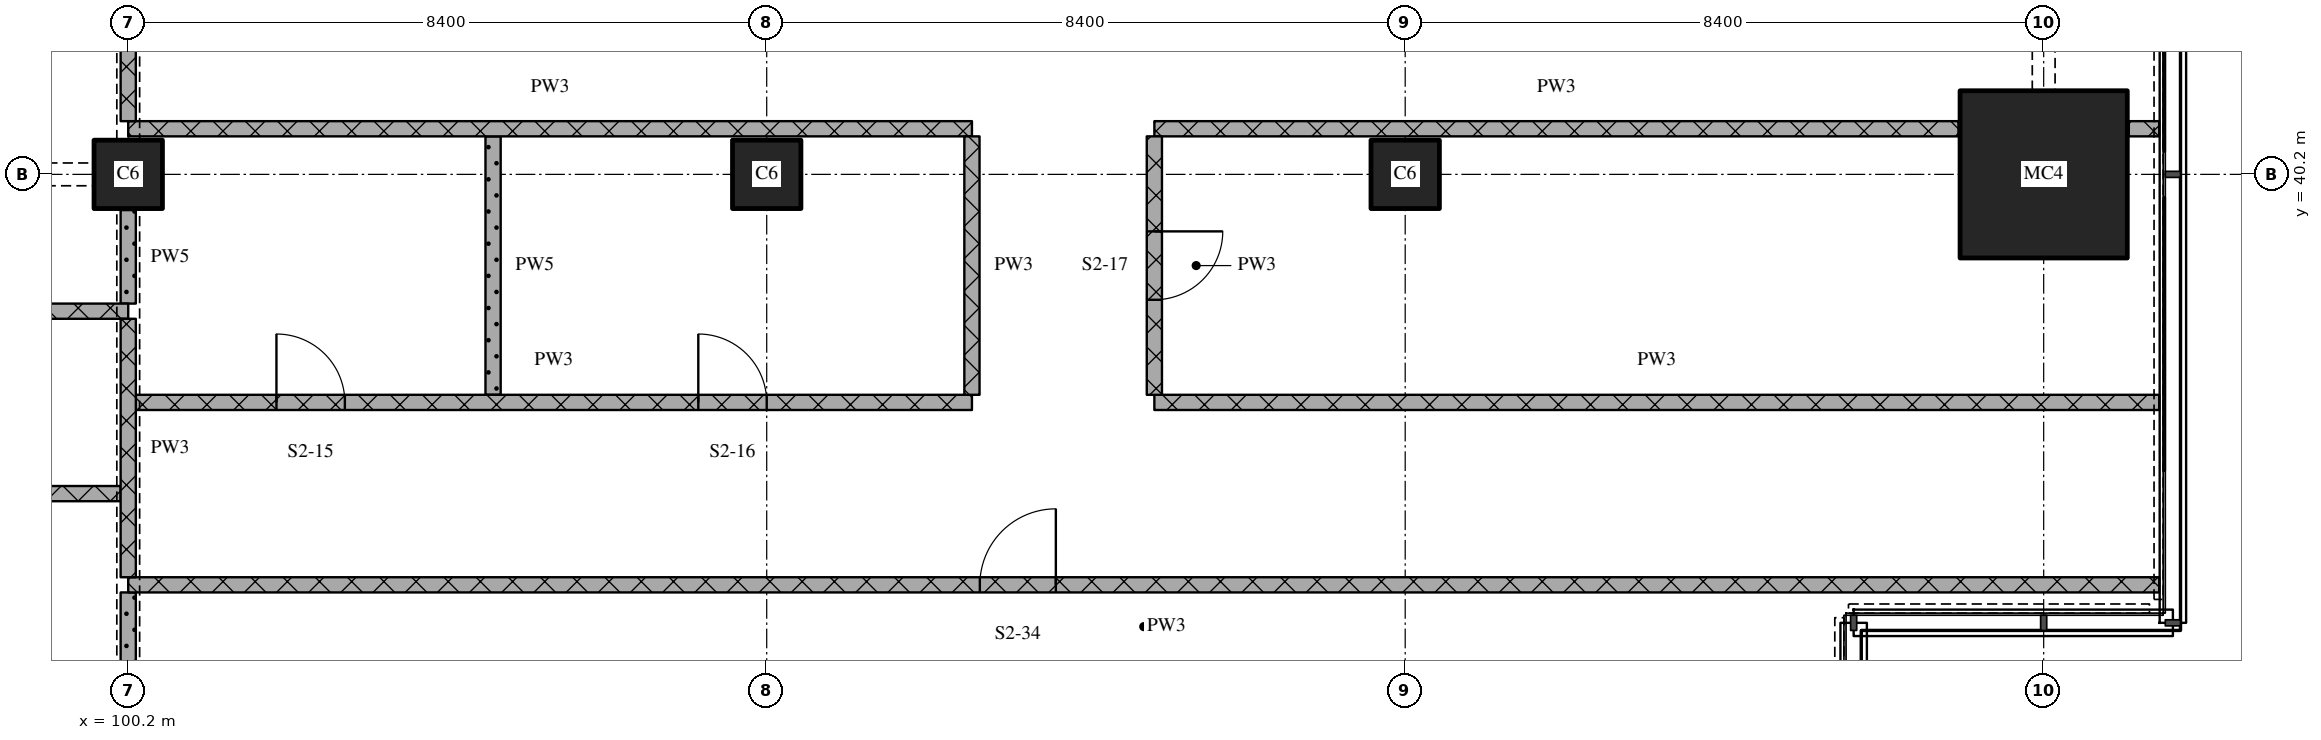
"""IFC4 building model, lengths in metres.
Left out: names, types, materials, properties, quantities, classifications, styles, units other than length and angle.
Written with IfcOpenShell. Run it as: python <this file> out.ifc"""

import sys

from ifc_helpers import new_model, si_unit, direction, frame, frame_2d, origin, origin_2d, place, context, subcontext, project, spatial, rectangle, extrude, element, fill, save


model = new_model("IFC4")
c1 = context("Model", 3, precision=1e-05, world=origin(), true_north=direction((0.0, 1.0)))
c2 = subcontext(c1, "Body", "Model", "MODEL_VIEW")
j1 = project(units=[si_unit("LENGTHUNIT", "METRE"), si_unit("PLANEANGLEUNIT", "RADIAN")], contexts=[c1])
p1 = place(None, origin())
s1 = spatial("IfcSite", under=j1, at=p1, CompositionType="ELEMENT")
p2 = place(p1, origin())
s2 = spatial("IfcBuilding", under=s1, at=p2, CompositionType="ELEMENT")
p3 = place(p2, frame((0.0, 0.0, 32.7)))
s3 = spatial("IfcBuildingStorey", under=s2, at=p3, CompositionType="ELEMENT", Elevation=32.7)
for number, where, z_axis, x_axis in (
    (1, (100.2, 40.2, 0.0), (0.0, 0.0, 1.0), (1.0, 0.0, 0.0)),
    (2, (108.6, 40.2, 0.0), (0.0, 0.0, 1.0), (1.0, 0.0, 0.0)),
    (3, (117.0, 40.2, 0.0), (0.0, 0.0, 1.0), (1.0, 0.0, 0.0)),
):
    element("IfcColumn", number, at=place(p3, frame(where, z_axis=z_axis, x_axis=x_axis)), inside=s3, PredefinedType="COLUMN", context=c2, shape_type="SweptSolid", body=[
        extrude(rectangle(XDim=0.9, YDim=0.9, at=origin_2d()), origin(), (0.0, 0.0, 1.0), 4.5),
    ])
p4 = place(p3, frame((125.4, 40.2, 0.0), z_axis=(0.0, 0.0, 1.0), x_axis=(1.0, 0.0, 0.0)))
e4 = element("IfcColumn", 4, at=p4, inside=s3, PredefinedType="COLUMN", context=c2, shape_type="SweptSolid", body=[
    extrude(rectangle(XDim=2.2, YDim=2.2, at=origin_2d()), origin(), (0.0, 0.0, 1.0), 4.5),
])
p5 = place(p3, frame((126.92, 34.8, 0.0), z_axis=(0.0, 0.0, 1.0), x_axis=(-1.0, 0.0, 0.0)))
e5 = element("IfcWall", 5, at=p5, inside=s3, PredefinedType="PARTITIONING", context=c2, shape_type="SweptSolid", body=[
    extrude(rectangle(XDim=26.72, YDim=0.2, at=frame_2d((13.36, 0.0))), origin(), (0.0, 0.0, 1.0), 4.22),
])
p6 = place(p5, frame((14.516, 0.0, 0.0)))
e6 = element("IfcOpeningElement", 6, at=p6, cuts=e5, PredefinedType="OPENING", context=c2, shape_type="SweptSolid", body=[
    extrude(rectangle(XDim=1.0, YDim=2.1, at=frame_2d((0.5, 1.05))), frame((0.0, 0.11, 0.0), z_axis=(0.0, -1.0, 0.0), x_axis=(1.0, 0.0, 0.0)), (0.0, 0.0, 1.0), 0.22),
])
p7 = place(p3, frame((100.1, 36.0, 0.0), z_axis=(0.0, 0.0, 1.0), x_axis=(-1.0, 0.0, 0.0)))
e7 = element("IfcWall", 7, at=p7, inside=s3, PredefinedType="PARTITIONING", context=c2, shape_type="SweptSolid", body=[
    extrude(rectangle(XDim=25.0, YDim=0.2, at=frame_2d((12.5, 0.0))), origin(), (0.0, 0.0, 1.0), 4.22),
])
p8 = place(p7, frame((12.0, 0.0, 0.0)))
e8 = element("IfcOpeningElement", 8, at=p8, cuts=e7, PredefinedType="OPENING", context=c2, shape_type="SweptSolid", body=[
    extrude(rectangle(XDim=1.0, YDim=2.1, at=frame_2d((0.5, 1.05))), frame((0.0, 0.11, 0.0), z_axis=(0.0, -1.0, 0.0), x_axis=(1.0, 0.0, 0.0)), (0.0, 0.0, 1.0), 0.22),
])
p9 = place(p3, frame((100.3, 37.2, 0.0), z_axis=(0.0, 0.0, 1.0), x_axis=(1.0, 0.0, 0.0)))
e9 = element("IfcWall", 9, at=p9, inside=s3, PredefinedType="PARTITIONING", context=c2, shape_type="SweptSolid", body=[
    extrude(rectangle(XDim=11.0, YDim=0.2, at=frame_2d((5.5, 0.0))), origin(), (0.0, 0.0, 1.0), 4.22),
])
p10 = place(p9, frame((1.85, 0.0, 0.0)))
e10 = element("IfcOpeningElement", 10, at=p10, cuts=e9, PredefinedType="OPENING", context=c2, shape_type="SweptSolid", body=[
    extrude(rectangle(XDim=0.9, YDim=2.1, at=frame_2d((0.45, 1.05))), frame((0.0, 0.11, 0.0), z_axis=(0.0, -1.0, 0.0), x_axis=(1.0, 0.0, 0.0)), (0.0, 0.0, 1.0), 0.22),
])
p11 = place(p9, frame((7.4, 0.0, 0.0)))
e11 = element("IfcOpeningElement", 11, at=p11, cuts=e9, PredefinedType="OPENING", context=c2, shape_type="SweptSolid", body=[
    extrude(rectangle(XDim=0.9, YDim=2.1, at=frame_2d((0.45, 1.05))), frame((0.0, 0.11, 0.0), z_axis=(0.0, -1.0, 0.0), x_axis=(1.0, 0.0, 0.0)), (0.0, 0.0, 1.0), 0.22),
])
p12 = place(p3, frame((113.7, 37.2, 0.0), z_axis=(0.0, 0.0, 1.0), x_axis=(1.0, 0.0, 0.0)))
e12 = element("IfcWall", 12, at=p12, inside=s3, PredefinedType="PARTITIONING", context=c2, shape_type="SweptSolid", body=[
    extrude(rectangle(XDim=13.22, YDim=0.2, at=frame_2d((6.61, 0.0))), origin(), (0.0, 0.0, 1.0), 4.22),
])
p13 = place(p3, frame((88.8, 38.4, 0.0), z_axis=(0.0, 0.0, 1.0), x_axis=(1.0, 0.0, 0.0)))
e13 = element("IfcWall", 13, at=p13, inside=s3, PredefinedType="PARTITIONING", context=c2, shape_type="SweptSolid", body=[
    extrude(rectangle(XDim=11.4, YDim=0.2, at=frame_2d((5.7, 0.0))), origin(), (0.0, 0.0, 1.0), 4.22),
])
p14 = place(p13, frame((4.95, 0.0, 0.0)))
e14 = element("IfcOpeningElement", 14, at=p14, cuts=e13, PredefinedType="OPENING", context=c2, shape_type="SweptSolid", body=[
    extrude(rectangle(XDim=0.9, YDim=2.1, at=frame_2d((0.45, 1.05))), frame((0.0, 0.11, 0.0), z_axis=(0.0, -1.0, 0.0), x_axis=(1.0, 0.0, 0.0)), (0.0, 0.0, 1.0), 0.22),
])
p15 = place(p13, frame((9.15, 0.0, 0.0)))
e15 = element("IfcOpeningElement", 15, at=p15, cuts=e13, PredefinedType="OPENING", context=c2, shape_type="SweptSolid", body=[
    extrude(rectangle(XDim=0.9, YDim=2.1, at=frame_2d((0.45, 1.05))), frame((0.0, 0.11, 0.0), z_axis=(0.0, -1.0, 0.0), x_axis=(1.0, 0.0, 0.0)), (0.0, 0.0, 1.0), 0.22),
])
p16 = place(p3, frame((100.2, 40.8, 0.0), z_axis=(0.0, 0.0, 1.0), x_axis=(1.0, 0.0, 0.0)))
e16 = element("IfcWall", 16, at=p16, inside=s3, PredefinedType="PARTITIONING", context=c2, shape_type="SweptSolid", body=[
    extrude(rectangle(XDim=11.1, YDim=0.2, at=frame_2d((5.55, 0.0))), origin(), (0.0, 0.0, 1.0), 4.22),
])
p17 = place(p3, frame((113.7, 40.8, 0.0), z_axis=(0.0, 0.0, 1.0), x_axis=(1.0, 0.0, 0.0)))
e17 = element("IfcWall", 17, at=p17, inside=s3, PredefinedType="PARTITIONING", context=c2, shape_type="SweptSolid", body=[
    extrude(rectangle(XDim=10.58, YDim=0.2, at=frame_2d((5.29, 0.0))), origin(), (0.0, 0.0, 1.0), 4.22),
])
p18 = place(p3, frame((126.52, 40.8, 0.0), z_axis=(0.0, 0.0, 1.0), x_axis=(1.0, 0.0, 0.0)))
e18 = element("IfcWall", 18, at=p18, inside=s3, PredefinedType="PARTITIONING", context=c2, shape_type="SweptSolid", body=[
    extrude(rectangle(XDim=0.4, YDim=0.2, at=frame_2d((0.2, 0.0))), origin(), (0.0, 0.0, 1.0), 4.22),
])
p19 = place(p3, frame((100.2, 38.3, 0.0), z_axis=(0.0, 0.0, 1.0), x_axis=(0.0, -1.0, 0.0)))
e19 = element("IfcWall", 19, at=p19, inside=s3, PredefinedType="PARTITIONING", context=c2, shape_type="SweptSolid", body=[
    extrude(rectangle(XDim=3.4, YDim=0.2, at=frame_2d((1.7, 0.0))), origin(), (0.0, 0.0, 1.0), 3.73),
])
p20 = place(p3, frame((100.2, 43.1, 0.0), z_axis=(0.0, 0.0, 1.0), x_axis=(0.0, -1.0, 0.0)))
e20 = element("IfcWall", 20, at=p20, inside=s3, PredefinedType="PARTITIONING", context=c2, shape_type="SweptSolid", body=[
    extrude(rectangle(XDim=2.2, YDim=0.2, at=frame_2d((1.1, 0.0))), origin(), (0.0, 0.0, 1.0), 3.33),
])
p21 = place(p3, frame((100.2, 34.7, 0.0), z_axis=(0.0, 0.0, 1.0), x_axis=(0.0, -1.0, 0.0)))
e21 = element("IfcWall", 21, at=p21, inside=s3, PredefinedType="PARTITIONING", context=c2, shape_type="SweptSolid", body=[
    extrude(rectangle(XDim=2.43, YDim=0.2, at=frame_2d((1.215, 0.0))), origin(), (0.0, 0.0, 1.0), 3.73),
])
p22 = place(p3, frame((100.2, 39.73, 0.0), z_axis=(0.0, 0.0, 1.0), x_axis=(0.0, -1.0, 0.0)))
e22 = element("IfcWall", 22, at=p22, inside=s3, PredefinedType="PARTITIONING", context=c2, shape_type="SweptSolid", body=[
    extrude(rectangle(XDim=1.23, YDim=0.2, at=frame_2d((0.615, 0.0))), origin(), (0.0, 0.0, 1.0), 3.73),
])
for number, where, z_axis, x_axis in (
    (23, (105.0, 40.7, 0.0), (0.0, 0.0, 1.0), (0.0, -1.0, 0.0)),
    (24, (111.3, 40.7, 0.0), (0.0, 0.0, 1.0), (0.0, -1.0, 0.0)),
):
    element("IfcWall", number, at=place(p3, frame(where, z_axis=z_axis, x_axis=x_axis)), inside=s3, PredefinedType="PARTITIONING", context=c2, shape_type="SweptSolid", body=[
        extrude(rectangle(XDim=3.4, YDim=0.2, at=frame_2d((1.7, 0.0))), origin(), (0.0, 0.0, 1.0), 4.22),
    ])
p23 = place(p3, frame((113.7, 40.7, 0.0), z_axis=(0.0, 0.0, 1.0), x_axis=(0.0, -1.0, 0.0)))
e25 = element("IfcWall", 25, at=p23, inside=s3, PredefinedType="PARTITIONING", context=c2, shape_type="SweptSolid", body=[
    extrude(rectangle(XDim=3.4, YDim=0.2, at=frame_2d((1.7, 0.0))), origin(), (0.0, 0.0, 1.0), 4.22),
])
p24 = place(p23, frame((1.25, 0.0, 0.0)))
e26 = element("IfcOpeningElement", 26, at=p24, cuts=e25, PredefinedType="OPENING", context=c2, shape_type="SweptSolid", body=[
    extrude(rectangle(XDim=0.9, YDim=2.1, at=frame_2d((0.45, 1.05))), frame((0.0, 0.11, 0.0), z_axis=(0.0, -1.0, 0.0), x_axis=(1.0, 0.0, 0.0)), (0.0, 0.0, 1.0), 0.22),
])
p25 = place(p6, origin())
e27 = element("IfcDoor", 27, at=p25, inside=s3, OperationType="SINGLE_SWING_RIGHT", PredefinedType="DOOR", context=c2, shape_type="SweptSolid", body=[
    extrude(rectangle(XDim=1.0, YDim=2.1, at=frame_2d((0.5, 1.05))), frame((0.0, 0.025, 0.0), z_axis=(0.0, -1.0, 0.0), x_axis=(1.0, 0.0, 0.0)), (0.0, 0.0, 1.0), 0.05),
])
fill(e6, e27)
p26 = place(p10, origin())
e28 = element("IfcDoor", 28, at=p26, inside=s3, OperationType="SINGLE_SWING_LEFT", PredefinedType="DOOR", context=c2, shape_type="SweptSolid", body=[
    extrude(rectangle(XDim=0.9, YDim=2.1, at=frame_2d((0.45, 1.05))), frame((0.0, 0.025, 0.0), z_axis=(0.0, -1.0, 0.0), x_axis=(1.0, 0.0, 0.0)), (0.0, 0.0, 1.0), 0.05),
])
fill(e10, e28)
p27 = place(p11, origin())
e29 = element("IfcDoor", 29, at=p27, inside=s3, OperationType="SINGLE_SWING_LEFT", PredefinedType="DOOR", context=c2, shape_type="SweptSolid", body=[
    extrude(rectangle(XDim=0.9, YDim=2.1, at=frame_2d((0.45, 1.05))), frame((0.0, 0.025, 0.0), z_axis=(0.0, -1.0, 0.0), x_axis=(1.0, 0.0, 0.0)), (0.0, 0.0, 1.0), 0.05),
])
fill(e11, e29)
p28 = place(p24, origin())
e30 = element("IfcDoor", 30, at=p28, inside=s3, OperationType="SINGLE_SWING_LEFT", PredefinedType="DOOR", context=c2, shape_type="SweptSolid", body=[
    extrude(rectangle(XDim=0.9, YDim=2.1, at=frame_2d((0.45, 1.05))), frame((0.0, 0.025, 0.0), z_axis=(0.0, -1.0, 0.0), x_axis=(1.0, 0.0, 0.0)), (0.0, 0.0, 1.0), 0.05),
])
fill(e26, e30)
save(model, sys.argv[1])
